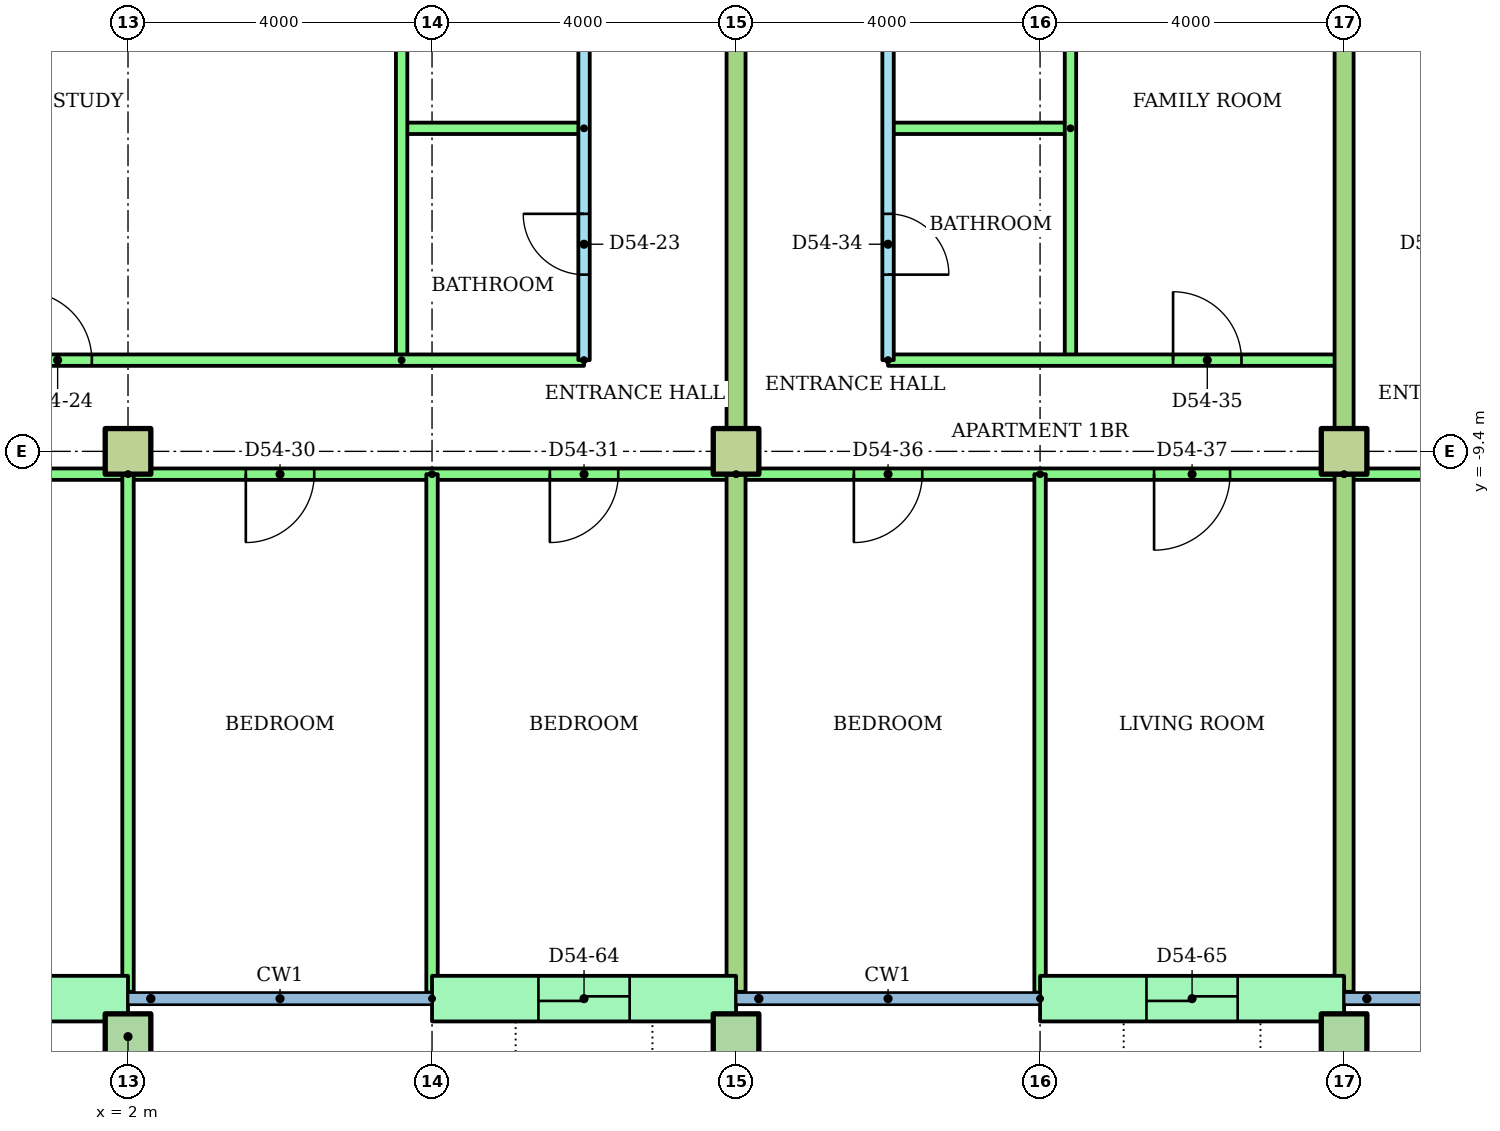
"""IFC4 building model, lengths in metres.
Left out: names, types, materials, properties, quantities, classifications, styles, units other than length and angle.
Written with IfcOpenShell. Run it as: python <this file> out.ifc"""

import sys

from ifc_helpers import new_model, si_unit, direction, frame, frame_2d, origin, origin_2d, place, context, subcontext, project, spatial, rectangle, hollow_rectangle, extrude, element, fill, save


model = new_model("IFC4")
c1 = context("Model", 3, precision=1e-05, world=origin(), true_north=direction((0.0, 1.0)))
c2 = subcontext(c1, "Body", "Model", "MODEL_VIEW")
j1 = project(units=[si_unit("LENGTHUNIT", "METRE"), si_unit("PLANEANGLEUNIT", "RADIAN")], contexts=[c1])
p1 = place(None, origin())
s1 = spatial("IfcSite", under=j1, at=p1, CompositionType="ELEMENT")
p2 = place(p1, origin())
s2 = spatial("IfcBuilding", under=s1, at=p2, CompositionType="ELEMENT")
p3 = place(p2, frame((0.0, 0.0, 210.8)))
s3 = spatial("IfcBuildingStorey", under=s2, at=p3, CompositionType="ELEMENT", Elevation=210.8)
for number, where in (
    (1, (2.0, -17.1, 0.0)),
    (2, (10.0, -17.1, 0.0)),
    (3, (18.0, -17.1, 0.0)),
):
    element("IfcColumn", number, at=place(p3, frame(where)), inside=s3, PredefinedType="COLUMN", context=c2, shape_type="SweptSolid", body=[
        extrude(hollow_rectangle(XDim=0.6, YDim=0.6, WallThickness=0.03, at=origin_2d()), origin(), (0.0, 0.0, 1.0), 3.2),
    ])
for number, where in (
    (4, (2.0, -9.4, 0.0)),
    (5, (10.0, -9.4, 0.0)),
    (6, (18.0, -9.4, 0.0)),
):
    element("IfcColumn", number, at=place(p3, frame(where)), inside=s3, PredefinedType="COLUMN", context=c2, shape_type="SweptSolid", body=[
        extrude(rectangle(XDim=0.6, YDim=0.6, at=origin_2d()), origin(), (0.0, 0.0, 1.0), 3.2),
    ])
p4 = place(p3, frame((-2.0, -16.6, 0.0)))
e7 = element("IfcWall", 7, at=p4, inside=s3, PredefinedType="STANDARD", context=c2, shape_type="SweptSolid", body=[
    extrude(rectangle(XDim=4.0, YDim=0.6, at=frame_2d((2.0, 0.0))), origin(), (0.0, 0.0, 1.0), 2.92),
])
p5 = place(p4, frame((1.4, 0.0, 0.0)))
e8 = element("IfcOpeningElement", 8, at=p5, cuts=e7, PredefinedType="OPENING", context=c2, shape_type="SweptSolid", body=[
    extrude(rectangle(XDim=1.2, YDim=2.1, at=frame_2d((0.6, 1.05))), frame((0.0, 0.31, 0.0), z_axis=(0.0, -1.0, 0.0), x_axis=(1.0, 0.0, 0.0)), (0.0, 0.0, 1.0), 0.62),
])
p6 = place(p3, frame((6.0, -16.6, 0.0)))
e9 = element("IfcWall", 9, at=p6, inside=s3, PredefinedType="STANDARD", context=c2, shape_type="SweptSolid", body=[
    extrude(rectangle(XDim=4.0, YDim=0.6, at=frame_2d((2.0, 0.0))), origin(), (0.0, 0.0, 1.0), 2.92),
])
p7 = place(p6, frame((1.4, 0.0, 0.0)))
e10 = element("IfcOpeningElement", 10, at=p7, cuts=e9, PredefinedType="OPENING", context=c2, shape_type="SweptSolid", body=[
    extrude(rectangle(XDim=1.2, YDim=2.1, at=frame_2d((0.6, 1.05))), frame((0.0, 0.31, 0.0), z_axis=(0.0, -1.0, 0.0), x_axis=(1.0, 0.0, 0.0)), (0.0, 0.0, 1.0), 0.62),
])
p8 = place(p3, frame((14.0, -16.6, 0.0)))
e11 = element("IfcWall", 11, at=p8, inside=s3, PredefinedType="STANDARD", context=c2, shape_type="SweptSolid", body=[
    extrude(rectangle(XDim=4.0, YDim=0.6, at=frame_2d((2.0, 0.0))), origin(), (0.0, 0.0, 1.0), 2.92),
])
p9 = place(p8, frame((1.4, 0.0, 0.0)))
e12 = element("IfcOpeningElement", 12, at=p9, cuts=e11, PredefinedType="OPENING", context=c2, shape_type="SweptSolid", body=[
    extrude(rectangle(XDim=1.2, YDim=2.1, at=frame_2d((0.6, 1.05))), frame((0.0, 0.31, 0.0), z_axis=(0.0, -1.0, 0.0), x_axis=(1.0, 0.0, 0.0)), (0.0, 0.0, 1.0), 0.62),
])
p10 = place(p3, frame((8.0, -8.2, 0.0), z_axis=(0.0, 0.0, 1.0), x_axis=(0.0, 1.0, 0.0)))
e13 = element("IfcWall", 13, at=p10, inside=s3, PredefinedType="PARTITIONING", context=c2, shape_type="SweptSolid", body=[
    extrude(rectangle(XDim=6.8, YDim=0.15, at=frame_2d((3.4, 0.0))), origin(), (0.0, 0.0, 1.0), 2.4),
])
p11 = place(p10, frame((4.475, 0.0, 0.0)))
e14 = element("IfcOpeningElement", 14, at=p11, cuts=e13, PredefinedType="OPENING", context=c2, shape_type="SweptSolid", body=[
    extrude(rectangle(XDim=0.9, YDim=2.1, at=frame_2d((0.45, 1.05))), frame((0.0, 0.085, 0.0), z_axis=(0.0, -1.0, 0.0), x_axis=(1.0, 0.0, 0.0)), (0.0, 0.0, 1.0), 0.17),
])
p12 = place(p10, frame((1.125, 0.0, 0.0)))
e15 = element("IfcOpeningElement", 15, at=p12, cuts=e13, PredefinedType="OPENING", context=c2, shape_type="SweptSolid", body=[
    extrude(rectangle(XDim=0.8, YDim=2.1, at=frame_2d((0.4, 1.05))), frame((0.0, 0.085, 0.0), z_axis=(0.0, -1.0, 0.0), x_axis=(1.0, 0.0, 0.0)), (0.0, 0.0, 1.0), 0.17),
])
p13 = place(p3, frame((8.0, -5.15, 0.0), z_axis=(0.0, 0.0, 1.0), x_axis=(-1.0, 0.0, 0.0)))
e16 = element("IfcWall", 16, at=p13, inside=s3, PredefinedType="PARTITIONING", context=c2, shape_type="SweptSolid", body=[
    extrude(rectangle(XDim=2.4, YDim=0.15, at=frame_2d((1.2, 0.0))), origin(), (0.0, 0.0, 1.0), 2.4),
])
p14 = place(p3, frame((5.6, -8.2, 0.0), z_axis=(0.0, 0.0, 1.0), x_axis=(0.0, 1.0, 0.0)))
e17 = element("IfcWall", 17, at=p14, inside=s3, PredefinedType="PARTITIONING", context=c2, shape_type="SweptSolid", body=[
    extrude(rectangle(XDim=6.8, YDim=0.15, at=frame_2d((3.4, 0.0))), origin(), (0.0, 0.0, 1.0), 2.4),
])
p15 = place(p3, frame((-14.0, -8.2, 0.0)))
e18 = element("IfcWall", 18, at=p15, inside=s3, PredefinedType="PARTITIONING", context=c2, shape_type="SweptSolid", body=[
    extrude(rectangle(XDim=22.0, YDim=0.15, at=frame_2d((11.0, 0.0))), origin(), (0.0, 0.0, 1.0), 2.4),
])
p16 = place(p15, frame((14.624, 0.0, 0.0)))
e19 = element("IfcOpeningElement", 19, at=p16, cuts=e18, PredefinedType="OPENING", context=c2, shape_type="SweptSolid", body=[
    extrude(rectangle(XDim=0.9, YDim=2.1, at=frame_2d((0.45, 1.05))), frame((0.0, 0.085, 0.0), z_axis=(0.0, -1.0, 0.0), x_axis=(1.0, 0.0, 0.0)), (0.0, 0.0, 1.0), 0.17),
])
p17 = place(p15, frame((8.476, 0.0, 0.0)))
e20 = element("IfcOpeningElement", 20, at=p17, cuts=e18, PredefinedType="OPENING", context=c2, shape_type="SweptSolid", body=[
    extrude(rectangle(XDim=0.9, YDim=2.1, at=frame_2d((0.45, 1.05))), frame((0.0, 0.085, 0.0), z_axis=(0.0, -1.0, 0.0), x_axis=(1.0, 0.0, 0.0)), (0.0, 0.0, 1.0), 0.17),
])
p18 = place(p15, frame((1.975, 0.0, 0.0)))
e21 = element("IfcOpeningElement", 21, at=p18, cuts=e18, PredefinedType="OPENING", context=c2, shape_type="SweptSolid", body=[
    extrude(rectangle(XDim=0.9, YDim=2.1, at=frame_2d((0.45, 1.05))), frame((0.0, 0.085, 0.0), z_axis=(0.0, -1.0, 0.0), x_axis=(1.0, 0.0, 0.0)), (0.0, 0.0, 1.0), 0.17),
])
p19 = place(p3, frame((10.0, -9.7, 0.0), z_axis=(0.0, 0.0, 1.0), x_axis=(-1.0, 0.0, 0.0)))
e22 = element("IfcWall", 22, at=p19, inside=s3, PredefinedType="PARTITIONING", context=c2, shape_type="SweptSolid", body=[
    extrude(rectangle(XDim=24.0, YDim=0.15, at=frame_2d((12.0, 0.0))), origin(), (0.0, 0.0, 1.0), 2.4),
])
p20 = place(p19, frame((21.55, 0.0, 0.0)))
e23 = element("IfcOpeningElement", 23, at=p20, cuts=e22, PredefinedType="OPENING", context=c2, shape_type="SweptSolid", body=[
    extrude(rectangle(XDim=0.9, YDim=2.1, at=frame_2d((0.45, 1.05))), frame((0.0, 0.085, 0.0), z_axis=(0.0, -1.0, 0.0), x_axis=(1.0, 0.0, 0.0)), (0.0, 0.0, 1.0), 0.17),
])
p21 = place(p19, frame((17.55, 0.0, 0.0)))
e24 = element("IfcOpeningElement", 24, at=p21, cuts=e22, PredefinedType="OPENING", context=c2, shape_type="SweptSolid", body=[
    extrude(rectangle(XDim=0.9, YDim=2.1, at=frame_2d((0.45, 1.05))), frame((0.0, 0.085, 0.0), z_axis=(0.0, -1.0, 0.0), x_axis=(1.0, 0.0, 0.0)), (0.0, 0.0, 1.0), 0.17),
])
p22 = place(p19, frame((11.5, 0.0, 0.0)))
e25 = element("IfcOpeningElement", 25, at=p22, cuts=e22, PredefinedType="OPENING", context=c2, shape_type="SweptSolid", body=[
    extrude(rectangle(XDim=1.0, YDim=2.1, at=frame_2d((0.5, 1.05))), frame((0.0, 0.085, 0.0), z_axis=(0.0, -1.0, 0.0), x_axis=(1.0, 0.0, 0.0)), (0.0, 0.0, 1.0), 0.17),
])
p23 = place(p19, frame((5.55, 0.0, 0.0)))
e26 = element("IfcOpeningElement", 26, at=p23, cuts=e22, PredefinedType="OPENING", context=c2, shape_type="SweptSolid", body=[
    extrude(rectangle(XDim=0.9, YDim=2.1, at=frame_2d((0.45, 1.05))), frame((0.0, 0.085, 0.0), z_axis=(0.0, -1.0, 0.0), x_axis=(1.0, 0.0, 0.0)), (0.0, 0.0, 1.0), 0.17),
])
p24 = place(p19, frame((1.55, 0.0, 0.0)))
e27 = element("IfcOpeningElement", 27, at=p24, cuts=e22, PredefinedType="OPENING", context=c2, shape_type="SweptSolid", body=[
    extrude(rectangle(XDim=0.9, YDim=2.1, at=frame_2d((0.45, 1.05))), frame((0.0, 0.085, 0.0), z_axis=(0.0, -1.0, 0.0), x_axis=(1.0, 0.0, 0.0)), (0.0, 0.0, 1.0), 0.17),
])
p25 = place(p3, frame((2.0, -9.7, 0.0), z_axis=(0.0, 0.0, 1.0), x_axis=(0.0, -1.0, 0.0)))
e28 = element("IfcWall", 28, at=p25, inside=s3, PredefinedType="PARTITIONING", context=c2, shape_type="SweptSolid", body=[
    extrude(rectangle(XDim=6.81, YDim=0.15, at=frame_2d((3.405, 0.0))), origin(), (0.0, 0.0, 1.0), 2.4),
])
p26 = place(p3, frame((6.0, -9.7, 0.0), z_axis=(0.0, 0.0, 1.0), x_axis=(0.0, -1.0, 0.0)))
e29 = element("IfcWall", 29, at=p26, inside=s3, PredefinedType="PARTITIONING", context=c2, shape_type="SweptSolid", body=[
    extrude(rectangle(XDim=6.821, YDim=0.15, at=frame_2d((3.411, 0.0))), origin(), (0.0, 0.0, 1.0), 2.4),
])
p27 = place(p3, frame((12.0, -1.4, 0.0), z_axis=(0.0, 0.0, 1.0), x_axis=(0.0, -1.0, 0.0)))
e30 = element("IfcWall", 30, at=p27, inside=s3, PredefinedType="PARTITIONING", context=c2, shape_type="SweptSolid", body=[
    extrude(rectangle(XDim=6.8, YDim=0.15, at=frame_2d((3.4, 0.0))), origin(), (0.0, 0.0, 1.0), 2.4),
])
p28 = place(p27, frame((1.425, 0.0, 0.0)))
e31 = element("IfcOpeningElement", 31, at=p28, cuts=e30, PredefinedType="OPENING", context=c2, shape_type="SweptSolid", body=[
    extrude(rectangle(XDim=0.9, YDim=2.1, at=frame_2d((0.45, 1.05))), frame((0.0, 0.085, 0.0), z_axis=(0.0, -1.0, 0.0), x_axis=(1.0, 0.0, 0.0)), (0.0, 0.0, 1.0), 0.17),
])
p29 = place(p27, frame((4.875, 0.0, 0.0)))
e32 = element("IfcOpeningElement", 32, at=p29, cuts=e30, PredefinedType="OPENING", context=c2, shape_type="SweptSolid", body=[
    extrude(rectangle(XDim=0.8, YDim=2.1, at=frame_2d((0.4, 1.05))), frame((0.0, 0.085, 0.0), z_axis=(0.0, -1.0, 0.0), x_axis=(1.0, 0.0, 0.0)), (0.0, 0.0, 1.0), 0.17),
])
p30 = place(p3, frame((14.4, -5.15, 0.0), z_axis=(0.0, 0.0, 1.0), x_axis=(-1.0, 0.0, 0.0)))
e33 = element("IfcWall", 33, at=p30, inside=s3, PredefinedType="PARTITIONING", context=c2, shape_type="SweptSolid", body=[
    extrude(rectangle(XDim=2.4, YDim=0.15, at=frame_2d((1.2, 0.0))), origin(), (0.0, 0.0, 1.0), 2.4),
])
p31 = place(p3, frame((14.4, -1.4, 0.0), z_axis=(0.0, 0.0, 1.0), x_axis=(0.0, -1.0, 0.0)))
e34 = element("IfcWall", 34, at=p31, inside=s3, PredefinedType="PARTITIONING", context=c2, shape_type="SweptSolid", body=[
    extrude(rectangle(XDim=6.8, YDim=0.15, at=frame_2d((3.4, 0.0))), origin(), (0.0, 0.0, 1.0), 2.4),
])
p32 = place(p3, frame((12.0, -8.2, 0.0)))
e35 = element("IfcWall", 35, at=p32, inside=s3, PredefinedType="PARTITIONING", context=c2, shape_type="SweptSolid", body=[
    extrude(rectangle(XDim=6.0, YDim=0.15, at=frame_2d((3.0, 0.0))), origin(), (0.0, 0.0, 1.0), 2.4),
])
p33 = place(p32, frame((3.75, 0.0, 0.0)))
e36 = element("IfcOpeningElement", 36, at=p33, cuts=e35, PredefinedType="OPENING", context=c2, shape_type="SweptSolid", body=[
    extrude(rectangle(XDim=0.9, YDim=2.1, at=frame_2d((0.45, 1.05))), frame((0.0, 0.085, 0.0), z_axis=(0.0, -1.0, 0.0), x_axis=(1.0, 0.0, 0.0)), (0.0, 0.0, 1.0), 0.17),
])
p34 = place(p3, frame((18.0, -9.7, 0.0), z_axis=(0.0, 0.0, 1.0), x_axis=(-1.0, 0.0, 0.0)))
e37 = element("IfcWall", 37, at=p34, inside=s3, PredefinedType="PARTITIONING", context=c2, shape_type="SweptSolid", body=[
    extrude(rectangle(XDim=8.0, YDim=0.15, at=frame_2d((4.0, 0.0))), origin(), (0.0, 0.0, 1.0), 2.4),
])
p35 = place(p34, frame((5.55, 0.0, 0.0)))
e38 = element("IfcOpeningElement", 38, at=p35, cuts=e37, PredefinedType="OPENING", context=c2, shape_type="SweptSolid", body=[
    extrude(rectangle(XDim=0.9, YDim=2.1, at=frame_2d((0.45, 1.05))), frame((0.0, 0.085, 0.0), z_axis=(0.0, -1.0, 0.0), x_axis=(1.0, 0.0, 0.0)), (0.0, 0.0, 1.0), 0.17),
])
p36 = place(p34, frame((1.5, 0.0, 0.0)))
e39 = element("IfcOpeningElement", 39, at=p36, cuts=e37, PredefinedType="OPENING", context=c2, shape_type="SweptSolid", body=[
    extrude(rectangle(XDim=1.0, YDim=2.1, at=frame_2d((0.5, 1.05))), frame((0.0, 0.085, 0.0), z_axis=(0.0, -1.0, 0.0), x_axis=(1.0, 0.0, 0.0)), (0.0, 0.0, 1.0), 0.17),
])
p37 = place(p3, frame((14.0, -9.7, 0.0), z_axis=(0.0, 0.0, 1.0), x_axis=(0.0, -1.0, 0.0)))
e40 = element("IfcWall", 40, at=p37, inside=s3, PredefinedType="PARTITIONING", context=c2, shape_type="SweptSolid", body=[
    extrude(rectangle(XDim=6.821, YDim=0.15, at=frame_2d((3.411, 0.0))), origin(), (0.0, 0.0, 1.0), 2.4),
])
p38 = place(p3, frame((10.0, -1.4, 0.0), z_axis=(0.0, 0.0, 1.0), x_axis=(0.0, -1.0, 0.0)))
e41 = element("IfcWall", 41, at=p38, inside=s3, PredefinedType="PARTITIONING", context=c2, shape_type="SweptSolid", body=[
    extrude(rectangle(XDim=15.11, YDim=0.25, at=frame_2d((7.555, 0.0))), origin(), (0.0, 0.0, 1.0), 2.4),
])
p39 = place(p3, frame((28.92, -9.7, 0.0), z_axis=(0.0, 0.0, 1.0), x_axis=(-1.0, 0.0, 0.0)))
e42 = element("IfcWall", 42, at=p39, inside=s3, PredefinedType="PARTITIONING", context=c2, shape_type="SweptSolid", body=[
    extrude(rectangle(XDim=10.92, YDim=0.15, at=frame_2d((5.46, 0.0))), origin(), (0.0, 0.0, 1.0), 2.4),
])
p40 = place(p39, frame((7.32, 0.0, 0.0)))
e43 = element("IfcOpeningElement", 43, at=p40, cuts=e42, PredefinedType="OPENING", context=c2, shape_type="SweptSolid", body=[
    extrude(rectangle(XDim=1.0, YDim=2.1, at=frame_2d((0.5, 1.05))), frame((0.0, 0.085, 0.0), z_axis=(0.0, -1.0, 0.0), x_axis=(1.0, 0.0, 0.0)), (0.0, 0.0, 1.0), 0.17),
])
p41 = place(p39, frame((1.544, 0.0, 0.0)))
e44 = element("IfcOpeningElement", 44, at=p41, cuts=e42, PredefinedType="OPENING", context=c2, shape_type="SweptSolid", body=[
    extrude(rectangle(XDim=0.9, YDim=2.1, at=frame_2d((0.45, 1.05))), frame((0.0, 0.085, 0.0), z_axis=(0.0, -1.0, 0.0), x_axis=(1.0, 0.0, 0.0)), (0.0, 0.0, 1.0), 0.17),
])
p42 = place(p3, frame((18.0, -1.4, 0.0), z_axis=(0.0, 0.0, 1.0), x_axis=(0.0, -1.0, 0.0)))
e45 = element("IfcWall", 45, at=p42, inside=s3, PredefinedType="PARTITIONING", context=c2, shape_type="SweptSolid", body=[
    extrude(rectangle(XDim=15.11, YDim=0.25, at=frame_2d((7.555, 0.0))), origin(), (0.0, 0.0, 1.0), 2.4),
])
p43 = place(p12, origin())
e46 = element("IfcDoor", 46, at=p43, inside=s3, OperationType="SINGLE_SWING_RIGHT", PredefinedType="DOOR", context=c2, shape_type="SweptSolid", body=[
    extrude(rectangle(XDim=0.8, YDim=2.1, at=frame_2d((0.4, 1.05))), frame((0.0, 0.025, 0.0), z_axis=(0.0, -1.0, 0.0), x_axis=(1.0, 0.0, 0.0)), (0.0, 0.0, 1.0), 0.05),
])
fill(e15, e46)
p44 = place(p16, origin())
e47 = element("IfcDoor", 47, at=p44, inside=s3, OperationType="SINGLE_SWING_LEFT", PredefinedType="DOOR", context=c2, shape_type="SweptSolid", body=[
    extrude(rectangle(XDim=0.9, YDim=2.1, at=frame_2d((0.45, 1.05))), frame((0.0, 0.025, 0.0), z_axis=(0.0, -1.0, 0.0), x_axis=(1.0, 0.0, 0.0)), (0.0, 0.0, 1.0), 0.05),
])
fill(e19, e47)
p45 = place(p23, origin())
e48 = element("IfcDoor", 48, at=p45, inside=s3, OperationType="SINGLE_SWING_RIGHT", PredefinedType="DOOR", context=c2, shape_type="SweptSolid", body=[
    extrude(rectangle(XDim=0.9, YDim=2.1, at=frame_2d((0.45, 1.05))), frame((0.0, 0.025, 0.0), z_axis=(0.0, -1.0, 0.0), x_axis=(1.0, 0.0, 0.0)), (0.0, 0.0, 1.0), 0.05),
])
fill(e26, e48)
p46 = place(p24, origin())
e49 = element("IfcDoor", 49, at=p46, inside=s3, OperationType="SINGLE_SWING_RIGHT", PredefinedType="DOOR", context=c2, shape_type="SweptSolid", body=[
    extrude(rectangle(XDim=0.9, YDim=2.1, at=frame_2d((0.45, 1.05))), frame((0.0, 0.025, 0.0), z_axis=(0.0, -1.0, 0.0), x_axis=(1.0, 0.0, 0.0)), (0.0, 0.0, 1.0), 0.05),
])
fill(e27, e49)
p47 = place(p29, origin())
e50 = element("IfcDoor", 50, at=p47, inside=s3, OperationType="SINGLE_SWING_RIGHT", PredefinedType="DOOR", context=c2, shape_type="SweptSolid", body=[
    extrude(rectangle(XDim=0.8, YDim=2.1, at=frame_2d((0.4, 1.05))), frame((0.0, 0.025, 0.0), z_axis=(0.0, -1.0, 0.0), x_axis=(1.0, 0.0, 0.0)), (0.0, 0.0, 1.0), 0.05),
])
fill(e32, e50)
p48 = place(p33, origin())
e51 = element("IfcDoor", 51, at=p48, inside=s3, OperationType="SINGLE_SWING_LEFT", PredefinedType="DOOR", context=c2, shape_type="SweptSolid", body=[
    extrude(rectangle(XDim=0.9, YDim=2.1, at=frame_2d((0.45, 1.05))), frame((0.0, 0.025, 0.0), z_axis=(0.0, -1.0, 0.0), x_axis=(1.0, 0.0, 0.0)), (0.0, 0.0, 1.0), 0.05),
])
fill(e36, e51)
p49 = place(p35, origin())
e52 = element("IfcDoor", 52, at=p49, inside=s3, OperationType="SINGLE_SWING_RIGHT", PredefinedType="DOOR", context=c2, shape_type="SweptSolid", body=[
    extrude(rectangle(XDim=0.9, YDim=2.1, at=frame_2d((0.45, 1.05))), frame((0.0, 0.025, 0.0), z_axis=(0.0, -1.0, 0.0), x_axis=(1.0, 0.0, 0.0)), (0.0, 0.0, 1.0), 0.05),
])
fill(e38, e52)
p50 = place(p36, origin())
e53 = element("IfcDoor", 53, at=p50, inside=s3, OperationType="SINGLE_SWING_RIGHT", PredefinedType="DOOR", context=c2, shape_type="SweptSolid", body=[
    extrude(rectangle(XDim=1.0, YDim=2.1, at=frame_2d((0.5, 1.05))), frame((0.0, 0.025, 0.0), z_axis=(0.0, -1.0, 0.0), x_axis=(1.0, 0.0, 0.0)), (0.0, 0.0, 1.0), 0.05),
])
fill(e39, e53)
p51 = place(p7, origin())
e54 = element("IfcDoor", 54, at=p51, inside=s3, OperationType="SLIDING_TO_LEFT", PredefinedType="DOOR", context=c2, shape_type="SweptSolid", body=[
    extrude(rectangle(XDim=1.2, YDim=2.1, at=frame_2d((0.6, 1.05))), frame((0.0, 0.025, 0.0), z_axis=(0.0, -1.0, 0.0), x_axis=(1.0, 0.0, 0.0)), (0.0, 0.0, 1.0), 0.05),
])
fill(e10, e54)
p52 = place(p9, origin())
e55 = element("IfcDoor", 55, at=p52, inside=s3, OperationType="SLIDING_TO_LEFT", PredefinedType="DOOR", context=c2, shape_type="SweptSolid", body=[
    extrude(rectangle(XDim=1.2, YDim=2.1, at=frame_2d((0.6, 1.05))), frame((0.0, 0.025, 0.0), z_axis=(0.0, -1.0, 0.0), x_axis=(1.0, 0.0, 0.0)), (0.0, 0.0, 1.0), 0.05),
])
fill(e12, e55)
save(model, sys.argv[1])
